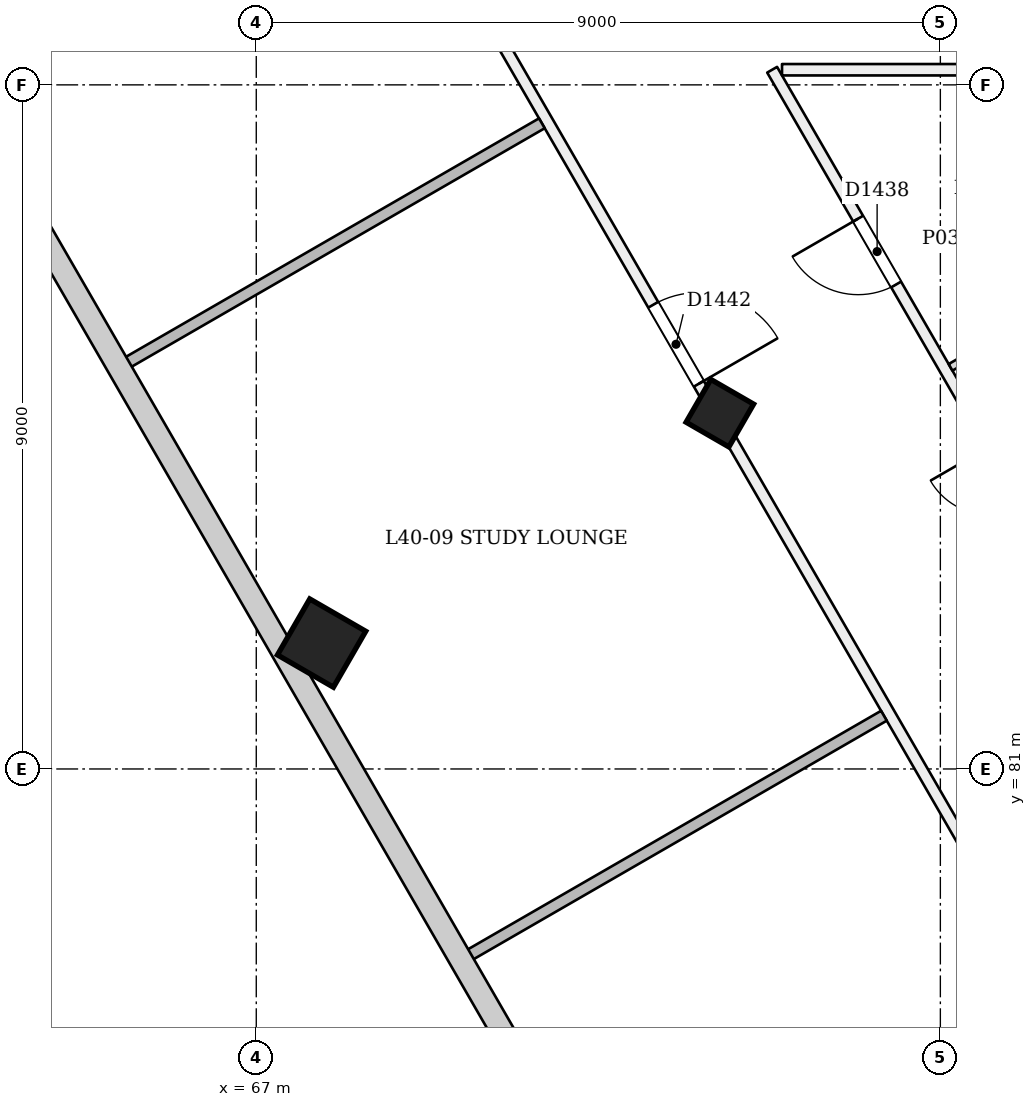
"""IFC4 building model, lengths in metres.
Left out: names, types, materials, properties, quantities, classifications, styles, units other than length and angle.
Written with IfcOpenShell. Run it as: python <this file> out.ifc"""

import sys

from ifc_helpers import new_model, si_unit, direction, frame, frame_2d, origin, origin_2d, place, context, subcontext, project, spatial, rectangle, extrude, element, fill, save


model = new_model("IFC4")
c1 = context("Model", 3, precision=1e-05, world=origin(), true_north=direction((0.0, 1.0)))
c2 = subcontext(c1, "Body", "Model", "MODEL_VIEW")
j1 = project(units=[si_unit("LENGTHUNIT", "METRE"), si_unit("PLANEANGLEUNIT", "RADIAN")], contexts=[c1])
p1 = place(None, origin())
s1 = spatial("IfcSite", under=j1, at=p1, CompositionType="ELEMENT")
p2 = place(p1, origin())
s2 = spatial("IfcBuilding", under=s1, at=p2, CompositionType="ELEMENT")
p3 = place(p2, frame((0.0, 0.0, 156.6)))
s3 = spatial("IfcBuildingStorey", under=s2, at=p3, CompositionType="ELEMENT", Elevation=156.6)
p4 = place(p3, frame((73.072, 85.634, -0.02), z_axis=(0.022222910879, 0.038415824599, 0.999014697916), x_axis=(-0.866023998813, -0.498523032246, 0.038434617219)))
e1 = element("IfcColumn", 1, at=p4, inside=s3, PredefinedType="COLUMN", context=c2, shape_type="SweptSolid", body=[
    extrude(rectangle(XDim=0.65, YDim=0.65, at=origin_2d()), origin(), (0.0, 0.0, 1.0), 3.604),
])
p5 = place(p3, frame((67.832, 82.609, -0.026), z_axis=(0.02215369191, 0.038413282303, 0.999016333038), x_axis=(-0.865364670574, -0.499669107893, 0.038402728296)))
e2 = element("IfcColumn", 2, at=p5, inside=s3, PredefinedType="COLUMN", context=c2, shape_type="SweptSolid", body=[
    extrude(rectangle(XDim=0.85, YDim=0.85, at=origin_2d()), origin(), (0.0, 0.0, 1.0), 3.604),
])
p6 = place(p3, frame((84.935, 70.89, 0.0), z_axis=(0.0, 0.0, 1.0), x_axis=(-0.500003015666, 0.866023662682, 0.0)))
e3 = element("IfcWall", 3, at=p6, inside=s3, PredefinedType="PARTITIONING", context=c2, shape_type="SweptSolid", body=[
    extrude(rectangle(XDim=22.296, YDim=0.15, at=frame_2d((11.148, 0.0))), origin(), (0.0, 0.0, 1.0), 3.15),
])
p7 = place(p6, frame((15.673, 0.0, 0.0)))
e4 = element("IfcOpeningElement", 4, at=p7, cuts=e3, PredefinedType="OPENING", context=c2, shape_type="SweptSolid", body=[
    extrude(rectangle(XDim=0.9, YDim=2.1, at=frame_2d((0.45, 1.05))), frame((0.0, 0.085, 0.0), z_axis=(0.0, -1.0, 0.0), x_axis=(1.0, 0.0, 0.0)), (0.0, 0.0, 1.0), 0.171),
])
p8 = place(p6, frame((19.034, 0.0, 0.0)))
e5 = element("IfcOpeningElement", 5, at=p8, cuts=e3, PredefinedType="OPENING", context=c2, shape_type="SweptSolid", body=[
    extrude(rectangle(XDim=1.0, YDim=2.1, at=frame_2d((0.5, 1.05))), frame((0.0, 0.085, 0.0), z_axis=(0.0, -1.0, 0.0), x_axis=(1.0, 0.0, 0.0)), (0.0, 0.0, 1.0), 0.171),
])
p9 = place(p6, frame((12.22, 0.0, 0.0)))
e6 = element("IfcOpeningElement", 6, at=p9, cuts=e3, PredefinedType="OPENING", context=c2, shape_type="SweptSolid", body=[
    extrude(rectangle(XDim=1.0, YDim=2.1, at=frame_2d((0.5, 1.05))), frame((0.0, 0.085, 0.0), z_axis=(0.0, -1.0, 0.0), x_axis=(1.0, 0.0, 0.0)), (0.0, 0.0, 1.0), 0.171),
])
p10 = place(p6, frame((7.455, 0.0, 0.0)))
e7 = element("IfcOpeningElement", 7, at=p10, cuts=e3, PredefinedType="OPENING", context=c2, shape_type="SweptSolid", body=[
    extrude(rectangle(XDim=1.0, YDim=2.1, at=frame_2d((0.5, 1.05))), frame((0.0, 0.085, 0.0), z_axis=(0.0, -1.0, 0.0), x_axis=(1.0, 0.0, 0.0)), (0.0, 0.0, 1.0), 0.171),
])
p11 = place(p3, frame((73.917, 90.199, 0.0), z_axis=(0.0, 0.0, 1.0), x_axis=(1.0, 0.0, 0.0)))
e8 = element("IfcWall", 8, at=p11, inside=s3, PredefinedType="PARTITIONING", context=c2, shape_type="SweptSolid", body=[
    extrude(rectangle(XDim=8.083, YDim=0.15, at=frame_2d((4.042, 0.0))), origin(), (0.0, 0.0, 1.0), 3.15),
])
p12 = place(p11, frame((6.883, 0.0, 0.0)))
e9 = element("IfcOpeningElement", 9, at=p12, cuts=e8, PredefinedType="OPENING", context=c2, shape_type="SweptSolid", body=[
    extrude(rectangle(XDim=1.0, YDim=2.1, at=frame_2d((0.5, 1.05))), frame((0.0, 0.085, 0.0), z_axis=(0.0, -1.0, 0.0), x_axis=(1.0, 0.0, 0.0)), (0.0, 0.0, 1.0), 0.171),
])
p13 = place(p3, frame((66.322, 97.326, 0.0), z_axis=(0.0, 0.0, 1.0), x_axis=(0.4999994764, -0.866025706085, 0.0)))
e10 = element("IfcWall", 10, at=p13, inside=s3, PredefinedType="PARTITIONING", context=c2, shape_type="SweptSolid", body=[
    extrude(rectangle(XDim=37.355, YDim=0.15, at=frame_2d((18.678, 0.0))), origin(), (0.0, 0.0, 1.0), 2.75),
])
p14 = place(p13, frame((2.8, 0.0, 0.0)))
e11 = element("IfcOpeningElement", 11, at=p14, cuts=e10, PredefinedType="OPENING", context=c2, shape_type="SweptSolid", body=[
    extrude(rectangle(XDim=1.2, YDim=2.1, at=frame_2d((0.6, 1.05))), frame((0.0, 0.085, 0.0), z_axis=(0.0, -1.0, 0.0), x_axis=(1.0, 0.0, 0.0)), (0.0, 0.0, 1.0), 0.171),
])
p15 = place(p13, frame((11.8, 0.0, 0.0)))
e12 = element("IfcOpeningElement", 12, at=p15, cuts=e10, PredefinedType="OPENING", context=c2, shape_type="SweptSolid", body=[
    extrude(rectangle(XDim=1.2, YDim=2.1, at=frame_2d((0.6, 1.05))), frame((0.0, 0.085, 0.0), z_axis=(0.0, -1.0, 0.0), x_axis=(1.0, 0.0, 0.0)), (0.0, 0.0, 1.0), 0.171),
])
p16 = place(p13, frame((24.15, 0.0, 0.0)))
e13 = element("IfcOpeningElement", 13, at=p16, cuts=e10, PredefinedType="OPENING", context=c2, shape_type="SweptSolid", body=[
    extrude(rectangle(XDim=1.2, YDim=2.1, at=frame_2d((0.6, 1.05))), frame((0.0, 0.085, 0.0), z_axis=(0.0, -1.0, 0.0), x_axis=(1.0, 0.0, 0.0)), (0.0, 0.0, 1.0), 0.171),
])
p17 = place(p13, frame((33.25, 0.0, 0.0)))
e14 = element("IfcOpeningElement", 14, at=p17, cuts=e10, PredefinedType="OPENING", context=c2, shape_type="SweptSolid", body=[
    extrude(rectangle(XDim=1.0, YDim=2.1, at=frame_2d((0.5, 1.05))), frame((0.0, 0.085, 0.0), z_axis=(0.0, -1.0, 0.0), x_axis=(1.0, 0.0, 0.0)), (0.0, 0.0, 1.0), 0.171),
])
p18 = place(p3, frame((79.275, 88.097, 0.0), z_axis=(0.0, 0.0, 1.0), x_axis=(-0.866014071019, -0.500019628412, 0.0)))
e15 = element("IfcWall", 15, at=p18, inside=s3, PredefinedType="PARTITIONING", context=c2, shape_type="SweptSolid", body=[
    extrude(rectangle(XDim=3.627, YDim=0.1, at=frame_2d((1.813, 0.0))), origin(), (0.0, 0.0, 1.0), 3.15),
])
for number, where, z_axis, x_axis in (
    (16, (65.28, 86.332, 0.0), (0.0, 0.0, 1.0), (0.866, 0.5, 0.0)),
    (17, (69.78, 78.538, 0.0), (0.0, 0.0, 1.0), (0.866, 0.5, 0.0)),
):
    element("IfcWall", number, at=place(p3, frame(where, z_axis=z_axis, x_axis=x_axis)), inside=s3, PredefinedType="PARTITIONING", context=c2, shape_type="SweptSolid", body=[
        extrude(rectangle(XDim=6.325, YDim=0.15, at=frame_2d((3.163, 0.0))), origin(), (0.0, 0.0, 1.0), 2.65),
    ])
p19 = place(p8, origin())
e18 = element("IfcDoor", 18, at=p19, inside=s3, OperationType="SINGLE_SWING_RIGHT", PredefinedType="NOTDEFINED", context=c2, shape_type="SweptSolid", body=[
    extrude(rectangle(XDim=1.0, YDim=2.1, at=frame_2d((0.5, 1.05))), frame((0.0, 0.025, 0.0), z_axis=(0.0, -1.0, 0.0), x_axis=(1.0, 0.0, 0.0)), (0.0, 0.0, 1.0), 0.05),
])
fill(e5, e18)
p20 = place(p15, origin())
e19 = element("IfcDoor", 19, at=p20, inside=s3, OperationType="SINGLE_SWING_RIGHT", PredefinedType="NOTDEFINED", context=c2, shape_type="SweptSolid", body=[
    extrude(rectangle(XDim=1.2, YDim=2.1, at=frame_2d((0.6, 1.05))), frame((0.0, 0.025, 0.0), z_axis=(0.0, -1.0, 0.0), x_axis=(1.0, 0.0, 0.0)), (0.0, 0.0, 1.0), 0.05),
])
fill(e12, e19)
save(model, sys.argv[1])
